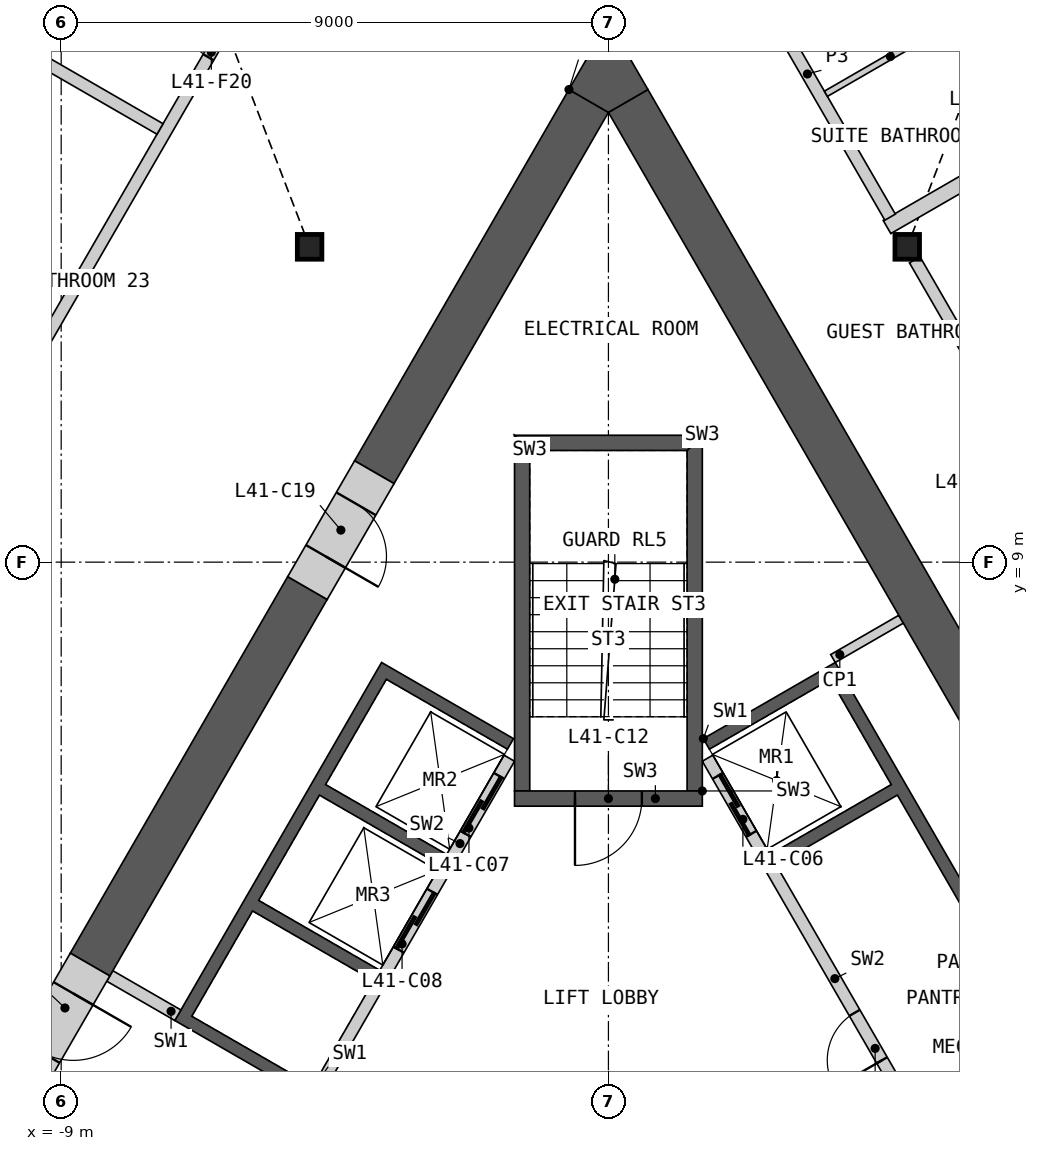
"""IFC4 building model, lengths in metres.
Left out: names, types, materials, properties, quantities, classifications, styles, units other than length and angle.
Written with IfcOpenShell. Run it as: python <this file> out.ifc"""

import sys

from ifc_helpers import new_model, si_unit, direction, frame, frame_2d, origin, origin_2d, place, context, subcontext, project, spatial, polyline, rectangle, i_section, outline, extrude, element, fill, save


model = new_model("IFC4")
c1 = context("Model", 3, precision=1e-05, world=origin(), true_north=direction((0.0, 1.0)))
c2 = subcontext(c1, "Body", "Model", "MODEL_VIEW")
j1 = project(units=[si_unit("LENGTHUNIT", "METRE"), si_unit("PLANEANGLEUNIT", "RADIAN")], contexts=[c1])
p1 = place(None, origin())
s1 = spatial("IfcSite", under=j1, at=p1, CompositionType="ELEMENT")
p2 = place(p1, origin())
s2 = spatial("IfcBuilding", under=s1, at=p2, CompositionType="ELEMENT")
p3 = place(p2, frame((0.0, 0.0, 190.8)))
s3 = spatial("IfcBuildingStorey", under=s2, at=p3, CompositionType="ELEMENT", Elevation=190.8)
for number, where, z_axis, x_axis in (
    (1, (-4.914, 14.186, 0.0), (0.0, 0.0, 1.0), (1.0, 0.0, 0.0)),
    (2, (4.914, 14.186, 0.0), (0.0, 0.0, 1.0), (1.0, 0.0, 0.0)),
):
    element("IfcColumn", number, at=place(p3, frame(where, z_axis=z_axis, x_axis=x_axis)), inside=s3, PredefinedType="COLUMN", context=c2, shape_type="SweptSolid", body=[
        extrude(i_section(OverallWidth=0.404, OverallDepth=0.407, WebThickness=0.027, FlangeThickness=0.044, at=origin_2d()), origin(), (0.0, 0.0, 1.0), 3.6),
    ])
p4 = place(p3, origin())
e3 = element("IfcWall", 3, at=p4, inside=s3, PredefinedType="SHEAR", context=c2, shape_type="SweptSolid", body=[
    extrude(outline(polyline([(1.561, 6.097), (3.731, 7.35), (8.231, -0.444), (6.061, -1.697), (5.96, -1.524), (7.952, -0.374), (4.752, 5.169), (2.76, 4.019), (2.66, 4.192), (4.652, 5.342), (3.652, 7.074), (1.66, 5.924), (1.561, 6.097)])), origin(), (0.0, 0.0, 1.0), 3.25),
])
p5 = place(p3, frame((5.817, -1.476, 0.0), z_axis=(0.0, 0.0, 1.0), x_axis=(-0.500002616675, 0.866023893041, 0.0)))
e4 = element("IfcWall", 4, at=p5, inside=s3, PredefinedType="SOLIDWALL", context=c2, shape_type="SweptSolid", body=[
    extrude(rectangle(XDim=8.373, YDim=0.2, at=frame_2d((4.187, 0.0))), origin(), (0.0, 0.0, 1.0), 3.25),
])
p6 = place(p5, frame((2.637, 0.0, 0.0)))
e5 = element("IfcOpeningElement", 5, at=p6, cuts=e4, PredefinedType="OPENING", context=c2, shape_type="SweptSolid", body=[
    extrude(rectangle(XDim=0.9, YDim=2.1, at=frame_2d((0.45, 1.05))), frame((0.0, 0.11, 0.0), z_axis=(0.0, -1.0, 0.0), x_axis=(1.0, 0.0, 0.0)), (0.0, 0.0, 1.0), 0.22),
])
p7 = place(p5, frame((6.937, 0.0, 0.0)))
e6 = element("IfcOpeningElement", 6, at=p7, cuts=e4, PredefinedType="OPENING", context=c2, shape_type="SweptSolid", body=[
    extrude(rectangle(XDim=1.1, YDim=2.1, at=frame_2d((0.55, 1.05))), frame((0.0, 0.11, 0.0), z_axis=(0.0, -1.0, 0.0), x_axis=(1.0, 0.0, 0.0)), (0.0, 0.0, 1.0), 0.22),
])
p8 = place(p3, origin())
e7 = element("IfcWall", 7, at=p8, inside=s3, PredefinedType="SHEAR", context=c2, shape_type="SweptSolid", body=[
    extrude(outline(polyline([(-4.96, 0.208), (-7.131, 1.461), (-3.731, 7.35), (-1.561, 6.097), (-1.66, 5.924), (-3.652, 7.074), (-4.652, 5.342), (-2.66, 4.192), (-2.76, 4.019), (-4.752, 5.169), (-5.752, 3.437), (-3.76, 2.287), (-3.861, 2.113), (-5.852, 3.263), (-6.852, 1.531), (-4.861, 0.381), (-4.96, 0.208)])), origin(), (0.0, 0.0, 1.0), 3.25),
])
p9 = place(p3, frame((-1.631, 5.776, 0.0), z_axis=(0.0, 0.0, 1.0), x_axis=(-0.499992876559, -0.866029516466, 0.0)))
e8 = element("IfcWall", 8, at=p9, inside=s3, PredefinedType="SOLIDWALL", context=c2, shape_type="SweptSolid", body=[
    extrude(rectangle(XDim=6.486, YDim=0.2, at=frame_2d((3.243, 0.0))), origin(), (0.0, 0.0, 1.0), 3.25),
])
p10 = place(p9, frame((0.337, 0.0, 0.0)))
e9 = element("IfcOpeningElement", 9, at=p10, cuts=e8, PredefinedType="OPENING", context=c2, shape_type="SweptSolid", body=[
    extrude(rectangle(XDim=1.1, YDim=2.1, at=frame_2d((0.55, 1.05))), frame((0.0, 0.11, 0.0), z_axis=(0.0, -1.0, 0.0), x_axis=(1.0, 0.0, 0.0)), (0.0, 0.0, 1.0), 0.22),
])
p11 = place(p9, frame((2.537, 0.0, 0.0)))
e10 = element("IfcOpeningElement", 10, at=p11, cuts=e8, PredefinedType="OPENING", context=c2, shape_type="SweptSolid", body=[
    extrude(rectangle(XDim=1.1, YDim=2.1, at=frame_2d((0.55, 1.05))), frame((0.0, 0.11, 0.0), z_axis=(0.0, -1.0, 0.0), x_axis=(1.0, 0.0, 0.0)), (0.0, 0.0, 1.0), 0.22),
])
p12 = place(p3, frame((-7.081, 1.548, 0.0), z_axis=(0.0, 0.0, 1.0), x_axis=(-0.866003189247, 0.500038474733, 0.0)))
e11 = element("IfcWall", 11, at=p12, inside=s3, PredefinedType="SHEAR", context=c2, shape_type="SweptSolid", body=[
    extrude(rectangle(XDim=1.293, YDim=0.2, at=frame_2d((0.646, 0.0))), origin(), (0.0, 0.0, 1.0), 3.25),
])
p13 = place(p3, origin())
e12 = element("IfcWall", 12, at=p13, inside=s3, PredefinedType="SHEAR", context=c2, shape_type="SweptSolid", body=[
    extrude(outline(polyline([(1.544, 5.237), (1.544, 11.087), (1.294, 10.837), (1.294, 5.237), (1.544, 5.237)])), origin(), (0.0, 0.0, 1.0), 3.25),
])
p14 = place(p3, origin())
e13 = element("IfcWall", 13, at=p14, inside=s3, PredefinedType="SHEAR", context=c2, shape_type="SweptSolid", body=[
    extrude(outline(polyline([(1.544, 11.087), (-1.544, 11.087), (-1.294, 10.837), (1.294, 10.837), (1.544, 11.087)])), origin(), (0.0, 0.0, 1.0), 3.25),
])
p15 = place(p3, origin())
e14 = element("IfcWall", 14, at=p15, inside=s3, PredefinedType="SHEAR", context=c2, shape_type="SweptSolid", body=[
    extrude(outline(polyline([(-1.294, 10.837), (-1.544, 11.087), (-1.544, 5.237), (-1.294, 5.237), (-1.294, 10.837)])), origin(), (0.0, 0.0, 1.0), 3.25),
])
p16 = place(p3, frame((1.544, 5.112, 0.0), z_axis=(0.0, 0.0, 1.0), x_axis=(-1.0, 0.0, 0.0)))
e15 = element("IfcWall", 15, at=p16, inside=s3, PredefinedType="SHEAR", context=c2, shape_type="SweptSolid", body=[
    extrude(rectangle(XDim=3.088, YDim=0.25, at=frame_2d((1.544, 0.0))), origin(), (0.0, 0.0, 1.0), 3.25),
])
p17 = place(p16, frame((0.994, 0.0, 0.0)))
e16 = element("IfcOpeningElement", 16, at=p17, cuts=e15, PredefinedType="OPENING", context=c2, shape_type="SweptSolid", body=[
    extrude(rectangle(XDim=1.1, YDim=2.1, at=frame_2d((0.55, 1.05))), frame((0.0, 0.135, 0.0), z_axis=(0.0, -1.0, 0.0), x_axis=(1.0, 0.0, 0.0)), (0.0, 0.0, 1.0), 0.27),
])
p18 = place(p3, frame((3.693, 7.415, 0.0), z_axis=(0.0, 0.0, 1.0), x_axis=(0.866003189247, 0.500038474733, 0.0)))
e17 = element("IfcWall", 17, at=p18, inside=s3, PredefinedType="PARTITIONING", context=c2, shape_type="SweptSolid", body=[
    extrude(rectangle(XDim=1.293, YDim=0.15, at=frame_2d((0.646, 0.0))), origin(), (0.0, 0.0, 1.0), 3.25),
])
p19 = place(p3, frame((6.875, 5.24, 0.0), z_axis=(0.0, 0.0, 1.0), x_axis=(-0.499997217876, 0.866027010039, 0.0)))
e18 = element("IfcWall", 18, at=p19, inside=s3, PredefinedType="SHEAR", context=c2, shape_type="SweptSolid", body=[
    extrude(rectangle(XDim=13.101, YDim=0.75, at=frame_2d((6.551, 0.0))), origin(), (0.0, 0.0, 1.0), 3.25),
])
p20 = place(p3, frame((-4.95, 8.574, 0.0), z_axis=(0.0, 0.0, 1.0), x_axis=(-0.499987463267, -0.866032641749, 0.0)))
e19 = element("IfcWall", 19, at=p20, inside=s3, PredefinedType="SHEAR", context=c2, shape_type="SweptSolid", body=[
    extrude(rectangle(XDim=7.151, YDim=0.75, at=frame_2d((3.575, 0.0))), origin(), (0.0, 0.0, 1.0), 3.25),
])
p21 = place(p3, frame((-0.325, 16.585, 0.0), z_axis=(0.0, 0.0, 1.0), x_axis=(-0.500012199891, -0.86601836006, 0.0)))
e20 = element("IfcWall", 20, at=p21, inside=s3, PredefinedType="SHEAR", context=c2, shape_type="SweptSolid", body=[
    extrude(rectangle(XDim=7.051, YDim=0.75, at=frame_2d((3.525, 0.0))), origin(), (0.0, 0.0, 1.0), 3.25),
])
p22 = place(p3, origin())
e21 = element("IfcWall", 21, at=p22, inside=s3, PredefinedType="SHEAR", context=c2, shape_type="SweptSolid", body=[
    extrude(outline(polyline([(-0.649, 16.773), (0.0, 17.898), (0.649, 16.773), (0.0, 16.398), (-0.649, 16.773)])), origin(), (0.0, 0.0, 1.0), 3.25),
])
p23 = place(p3, frame((-3.85, 10.479, 0.0), z_axis=(0.0, 0.0, 1.0), x_axis=(-0.499946605688, -0.86605622881, 0.0)))
e22 = element("IfcWall", 22, at=p23, inside=s3, PredefinedType="SHEAR", context=c2, shape_type="SweptSolid", body=[
    extrude(rectangle(XDim=2.2, YDim=0.75, at=frame_2d((1.1, 0.0))), origin(), (0.0, 0.0, 1.0), 3.25),
])
p24 = place(p23, frame((0.6, 0.0, 0.0)))
e23 = element("IfcOpeningElement", 23, at=p24, cuts=e22, PredefinedType="OPENING", context=c2, shape_type="SweptSolid", body=[
    extrude(rectangle(XDim=1.0, YDim=2.1, at=frame_2d((0.5, 1.05))), frame((0.0, 0.385, 0.0), z_axis=(0.0, -1.0, 0.0), x_axis=(1.0, 0.0, 0.0)), (0.0, 0.0, 1.0), 0.77),
])
p25 = place(p3, frame((-8.525, 2.382, 0.0), z_axis=(0.0, 0.0, 1.0), x_axis=(-0.500077893725, -0.86598042715, 0.0)))
e24 = element("IfcWall", 24, at=p25, inside=s3, PredefinedType="SHEAR", context=c2, shape_type="SweptSolid", body=[
    extrude(rectangle(XDim=2.2, YDim=0.75, at=frame_2d((1.1, 0.0))), origin(), (0.0, 0.0, 1.0), 3.25),
])
p26 = place(p25, frame((0.55, 0.0, 0.0)))
e25 = element("IfcOpeningElement", 25, at=p26, cuts=e24, PredefinedType="OPENING", context=c2, shape_type="SweptSolid", body=[
    extrude(rectangle(XDim=1.1, YDim=2.1, at=frame_2d((0.55, 1.05))), frame((0.0, 0.385, 0.0), z_axis=(0.0, -1.0, 0.0), x_axis=(1.0, 0.0, 0.0)), (0.0, 0.0, 1.0), 0.77),
])
p27 = place(p3, frame((-19.476, -5.035, 0.0), z_axis=(0.0, 0.0, 1.0), x_axis=(0.500000757641, 0.86602496636, 0.0)))
e26 = element("IfcWall", 26, at=p27, inside=s3, PredefinedType="PARTITIONING", context=c2, shape_type="SweptSolid", body=[
    extrude(rectangle(XDim=28.198, YDim=0.2, at=frame_2d((14.099, 0.0))), origin(), (0.0, 0.0, 1.0), 3.25),
])
p28 = place(p27, frame((25.796, 0.0, 0.0)))
e27 = element("IfcOpeningElement", 27, at=p28, cuts=e26, PredefinedType="OPENING", context=c2, shape_type="SweptSolid", body=[
    extrude(rectangle(XDim=0.95, YDim=2.1, at=frame_2d((0.475, 1.05))), frame((0.0, 0.11, 0.0), z_axis=(0.0, -1.0, 0.0), x_axis=(1.0, 0.0, 0.0)), (0.0, 0.0, 1.0), 0.22),
])
p29 = place(p27, frame((14.603, 0.0, 0.0)))
e28 = element("IfcOpeningElement", 28, at=p29, cuts=e26, PredefinedType="OPENING", context=c2, shape_type="SweptSolid", body=[
    extrude(rectangle(XDim=1.1, YDim=2.1, at=frame_2d((0.55, 1.05))), frame((0.0, 0.11, 0.0), z_axis=(0.0, -1.0, 0.0), x_axis=(1.0, 0.0, 0.0)), (0.0, 0.0, 1.0), 0.22),
])
p30 = place(p27, frame((11.993, 0.0, 0.0)))
e29 = element("IfcOpeningElement", 29, at=p30, cuts=e26, PredefinedType="OPENING", context=c2, shape_type="SweptSolid", body=[
    extrude(rectangle(XDim=1.1, YDim=2.1, at=frame_2d((0.55, 1.05))), frame((0.0, 0.11, 0.0), z_axis=(0.0, -1.0, 0.0), x_axis=(1.0, 0.0, 0.0)), (0.0, 0.0, 1.0), 0.22),
])
p31 = place(p27, frame((1.452, 0.0, 0.0)))
e30 = element("IfcOpeningElement", 30, at=p31, cuts=e26, PredefinedType="OPENING", context=c2, shape_type="SweptSolid", body=[
    extrude(rectangle(XDim=0.95, YDim=2.1, at=frame_2d((0.475, 1.05))), frame((0.0, 0.11, 0.0), z_axis=(0.0, -1.0, 0.0), x_axis=(1.0, 0.0, 0.0)), (0.0, 0.0, 1.0), 0.22),
])
p32 = place(p3, frame((4.582, 14.512, 0.0), z_axis=(0.0, 0.0, 1.0), x_axis=(0.866027263711, 0.4999967785, 0.0)))
e31 = element("IfcWall", 31, at=p32, inside=s3, PredefinedType="PARTITIONING", context=c2, shape_type="SweptSolid", body=[
    extrude(rectangle(XDim=12.994, YDim=0.25, at=frame_2d((6.497, 0.0))), origin(), (0.0, 0.0, 1.0), 2.404),
])
p33 = place(p3, frame((5.038, 13.972, 0.0), z_axis=(0.0, 0.0, 1.0), x_axis=(0.50000393355, -0.866023132736, 0.0)))
e32 = element("IfcWall", 32, at=p33, inside=s3, PredefinedType="PARTITIONING", context=c2, shape_type="SweptSolid", body=[
    extrude(rectangle(XDim=9.335, YDim=0.2, at=frame_2d((4.667, 0.0))), origin(), (0.0, 0.0, 1.0), 3.25),
])
p34 = place(p33, frame((5.979, 0.0, 0.0)))
e33 = element("IfcOpeningElement", 33, at=p34, cuts=e32, PredefinedType="OPENING", context=c2, shape_type="SweptSolid", body=[
    extrude(rectangle(XDim=1.8, YDim=2.1, at=frame_2d((0.9, 1.05))), frame((0.0, 0.11, 0.0), z_axis=(0.0, -1.0, 0.0), x_axis=(1.0, 0.0, 0.0)), (0.0, 0.0, 1.0), 0.22),
])
p35 = place(p33, frame((3.163, 0.0, 0.0)))
e34 = element("IfcOpeningElement", 34, at=p35, cuts=e32, PredefinedType="OPENING", context=c2, shape_type="SweptSolid", body=[
    extrude(rectangle(XDim=1.0, YDim=2.1, at=frame_2d((0.5, 1.05))), frame((0.0, 0.11, 0.0), z_axis=(0.0, -1.0, 0.0), x_axis=(1.0, 0.0, 0.0)), (0.0, 0.0, 1.0), 0.22),
])
p36 = place(p3, frame((1.913, 19.385, 0.0), z_axis=(0.0, 0.0, 1.0), x_axis=(0.499972435384, -0.866041317638, 0.0)))
e35 = element("IfcWall", 35, at=p36, inside=s3, PredefinedType="PARTITIONING", context=c2, shape_type="SweptSolid", body=[
    extrude(rectangle(XDim=5.439, YDim=0.2, at=frame_2d((2.719, 0.0))), origin(), (0.0, 0.0, 1.0), 3.25),
])
p37 = place(p36, frame((0.351, 0.0, 0.0)))
e36 = element("IfcOpeningElement", 36, at=p37, cuts=e35, PredefinedType="OPENING", context=c2, shape_type="SweptSolid", body=[
    extrude(rectangle(XDim=1.1, YDim=2.1, at=frame_2d((0.55, 1.05))), frame((0.0, 0.11, 0.0), z_axis=(0.0, -1.0, 0.0), x_axis=(1.0, 0.0, 0.0)), (0.0, 0.0, 1.0), 0.22),
])
p38 = place(p3, frame((-15.835, 21.009, 0.0), z_axis=(0.0, 0.0, 1.0), x_axis=(0.866024525919, -0.500001520505, 0.0)))
e37 = element("IfcWall", 37, at=p38, inside=s3, PredefinedType="PARTITIONING", context=c2, shape_type="SweptSolid", body=[
    extrude(rectangle(XDim=9.769, YDim=0.2, at=frame_2d((4.885, 0.0))), origin(), (0.0, 0.0, 1.0), 2.404),
])
p39 = place(p3, frame((5.717, 17.996, 0.0), z_axis=(0.0, 0.0, 1.0), x_axis=(0.500027264788, -0.866009661879, 0.0)))
e38 = element("IfcWall", 38, at=p39, inside=s3, PredefinedType="PARTITIONING", context=c2, shape_type="SweptSolid", body=[
    extrude(rectangle(XDim=5.2, YDim=0.1, at=frame_2d((2.6, 0.0))), origin(), (0.0, 0.0, 1.0), 2.404),
])
p40 = place(p39, frame((4.0, 0.0, 0.0)))
e39 = element("IfcOpeningElement", 39, at=p40, cuts=e38, PredefinedType="OPENING", context=c2, shape_type="SweptSolid", body=[
    extrude(rectangle(XDim=0.95, YDim=2.1, at=frame_2d((0.475, 1.05))), frame((0.0, 0.06, 0.0), z_axis=(0.0, -1.0, 0.0), x_axis=(1.0, 0.0, 0.0)), (0.0, 0.0, 1.0), 0.12),
])
p41 = place(p39, frame((0.25, 0.0, 0.0)))
e40 = element("IfcOpeningElement", 40, at=p41, cuts=e38, PredefinedType="OPENING", context=c2, shape_type="SweptSolid", body=[
    extrude(rectangle(XDim=0.95, YDim=2.1, at=frame_2d((0.475, 1.05))), frame((0.0, 0.06, 0.0), z_axis=(0.0, -1.0, 0.0), x_axis=(1.0, 0.0, 0.0)), (0.0, 0.0, 1.0), 0.12),
])
p42 = place(p3, frame((3.576, 16.703, 0.0), z_axis=(0.0, 0.0, 1.0), x_axis=(0.866057815567, 0.499943856944, 0.0)))
e41 = element("IfcWall", 41, at=p42, inside=s3, PredefinedType="PARTITIONING", context=c2, shape_type="SweptSolid", body=[
    extrude(rectangle(XDim=2.45, YDim=0.1, at=frame_2d((1.225, 0.0))), origin(), (0.0, 0.0, 1.0), 2.404),
])
p43 = place(p3, frame((-10.996, 14.752, 0.0), z_axis=(0.0, 0.0, 1.0), x_axis=(0.866014668023, -0.500018594424, 0.0)))
e42 = element("IfcWall", 42, at=p43, inside=s3, PredefinedType="PARTITIONING", context=c2, shape_type="SweptSolid", body=[
    extrude(rectangle(XDim=2.45, YDim=0.1, at=frame_2d((1.225, 0.0))), origin(), (0.0, 0.0, 1.0), 2.404),
])
p44 = place(p6, origin())
e43 = element("IfcDoor", 43, at=p44, inside=s3, OperationType="SINGLE_SWING_LEFT", PredefinedType="DOOR", context=c2, shape_type="SweptSolid", body=[
    extrude(rectangle(XDim=0.9, YDim=2.1, at=frame_2d((0.45, 1.05))), frame((0.0, 0.025, 0.0), z_axis=(0.0, -1.0, 0.0), x_axis=(1.0, 0.0, 0.0)), (0.0, 0.0, 1.0), 0.05),
])
fill(e5, e43)
p45 = place(p7, origin())
e44 = element("IfcDoor", 44, at=p45, inside=s3, OperationType="SLIDING_TO_LEFT", PredefinedType="DOOR", context=c2, shape_type="SweptSolid", body=[
    extrude(rectangle(XDim=1.1, YDim=2.1, at=frame_2d((0.55, 1.05))), frame((0.0, 0.025, 0.0), z_axis=(0.0, -1.0, 0.0), x_axis=(1.0, 0.0, 0.0)), (0.0, 0.0, 1.0), 0.05),
])
fill(e6, e44)
p46 = place(p10, origin())
e45 = element("IfcDoor", 45, at=p46, inside=s3, OperationType="SLIDING_TO_LEFT", PredefinedType="DOOR", context=c2, shape_type="SweptSolid", body=[
    extrude(rectangle(XDim=1.1, YDim=2.1, at=frame_2d((0.55, 1.05))), frame((0.0, 0.025, 0.0), z_axis=(0.0, -1.0, 0.0), x_axis=(1.0, 0.0, 0.0)), (0.0, 0.0, 1.0), 0.05),
])
fill(e9, e45)
p47 = place(p11, origin())
e46 = element("IfcDoor", 46, at=p47, inside=s3, OperationType="SLIDING_TO_LEFT", PredefinedType="DOOR", context=c2, shape_type="SweptSolid", body=[
    extrude(rectangle(XDim=1.1, YDim=2.1, at=frame_2d((0.55, 1.05))), frame((0.0, 0.025, 0.0), z_axis=(0.0, -1.0, 0.0), x_axis=(1.0, 0.0, 0.0)), (0.0, 0.0, 1.0), 0.05),
])
fill(e10, e46)
p48 = place(p17, origin())
e47 = element("IfcDoor", 47, at=p48, inside=s3, OperationType="SINGLE_SWING_RIGHT", PredefinedType="DOOR", context=c2, shape_type="SweptSolid", body=[
    extrude(rectangle(XDim=1.1, YDim=2.1, at=frame_2d((0.55, 1.05))), frame((0.0, 0.025, 0.0), z_axis=(0.0, -1.0, 0.0), x_axis=(1.0, 0.0, 0.0)), (0.0, 0.0, 1.0), 0.05),
])
fill(e16, e47)
p49 = place(p24, origin())
e48 = element("IfcDoor", 48, at=p49, inside=s3, OperationType="SINGLE_SWING_RIGHT", PredefinedType="DOOR", context=c2, shape_type="SweptSolid", body=[
    extrude(rectangle(XDim=1.0, YDim=2.1, at=frame_2d((0.5, 1.05))), frame((0.0, 0.13, 0.0), z_axis=(0.0, -1.0, 0.0), x_axis=(1.0, 0.0, 0.0)), (0.0, 0.0, 1.0), 0.05),
])
fill(e23, e48)
p50 = place(p26, origin())
e49 = element("IfcDoor", 49, at=p50, inside=s3, OperationType="SINGLE_SWING_LEFT", PredefinedType="DOOR", context=c2, shape_type="SweptSolid", body=[
    extrude(rectangle(XDim=1.1, YDim=2.1, at=frame_2d((0.55, 1.05))), frame((0.0, 0.13, 0.0), z_axis=(0.0, -1.0, 0.0), x_axis=(1.0, 0.0, 0.0)), (0.0, 0.0, 1.0), 0.05),
])
fill(e25, e49)
p51 = place(p28, origin())
e50 = element("IfcDoor", 50, at=p51, inside=s3, OperationType="SINGLE_SWING_RIGHT", PredefinedType="DOOR", context=c2, shape_type="SweptSolid", body=[
    extrude(rectangle(XDim=0.95, YDim=2.1, at=frame_2d((0.475, 1.05))), frame((0.0, 0.025, 0.0), z_axis=(0.0, -1.0, 0.0), x_axis=(1.0, 0.0, 0.0)), (0.0, 0.0, 1.0), 0.05),
])
fill(e27, e50)
save(model, sys.argv[1])
